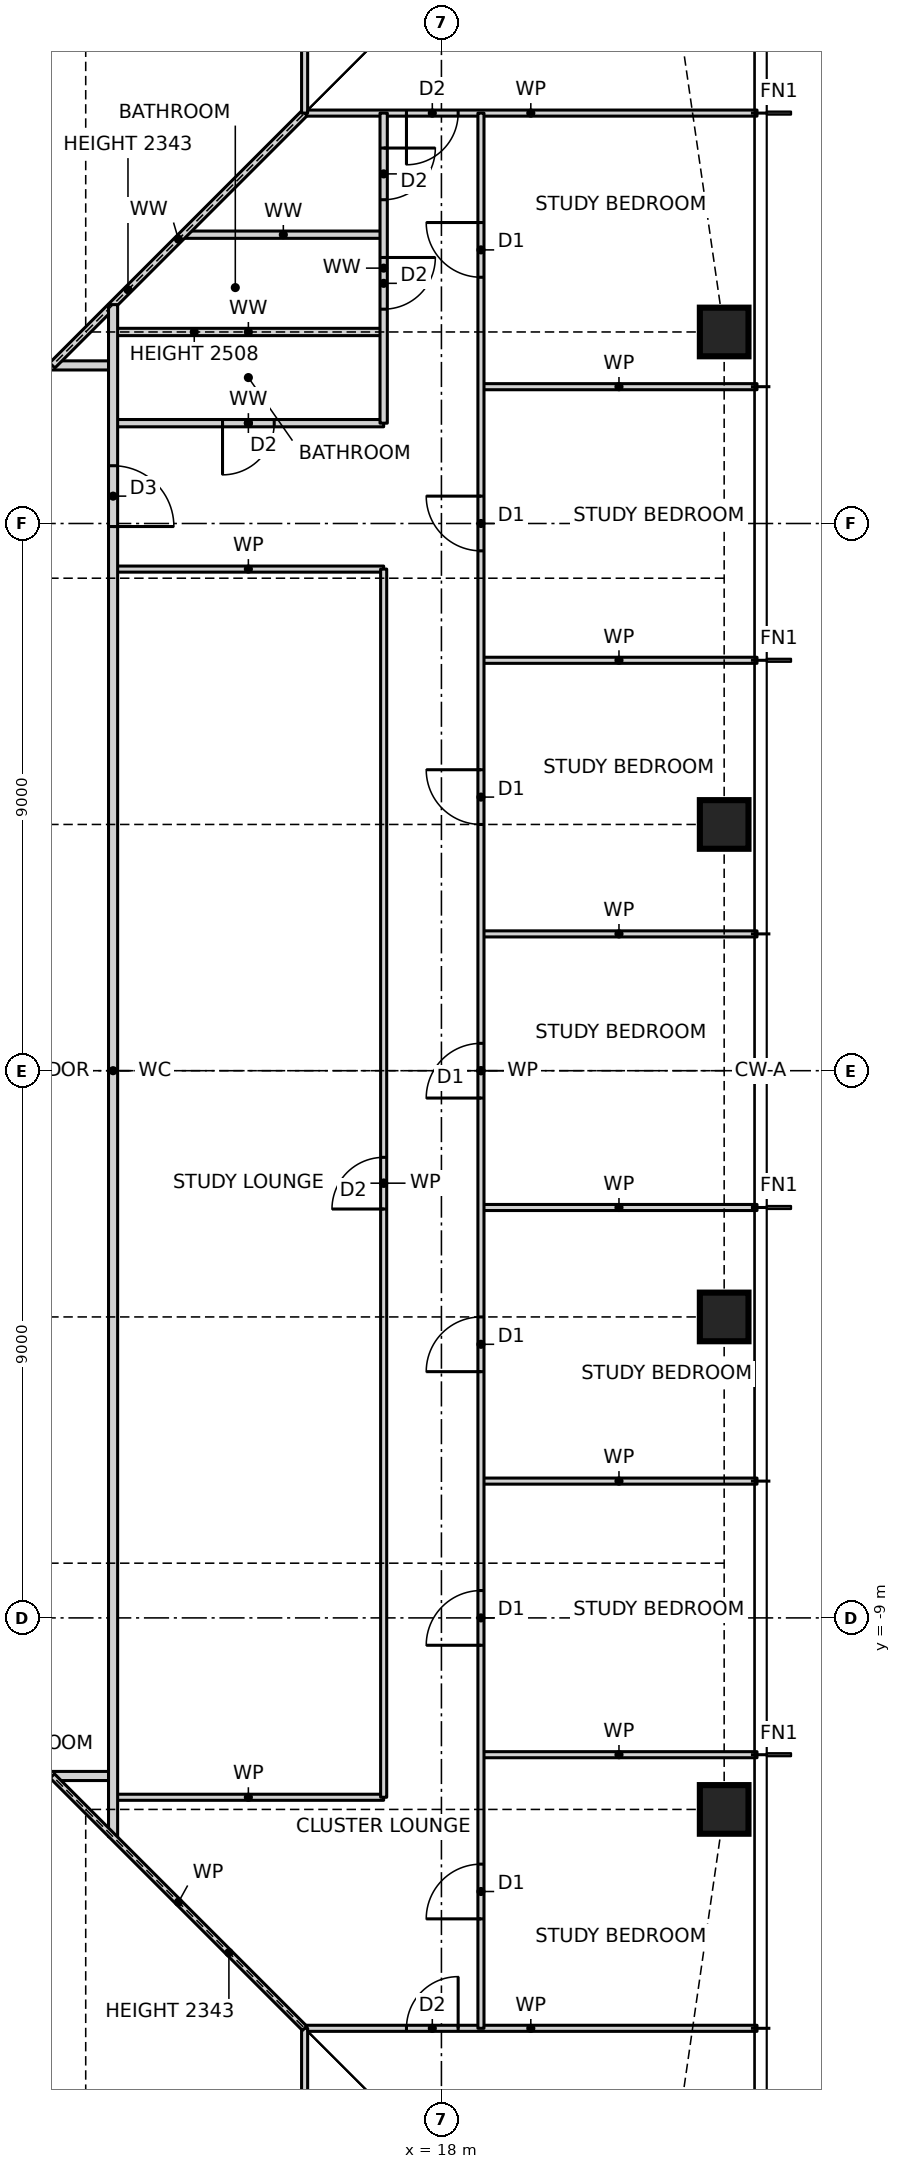
"""IFC4 building model, lengths in metres.
Left out: names, types, materials, properties, quantities, classifications, styles, units other than length and angle.
Written with IfcOpenShell. Run it as: python <this file> out.ifc"""

import sys

from ifc_helpers import new_model, si_unit, direction, frame, frame_2d, origin, origin_2d, place, context, subcontext, project, spatial, rectangle, hollow_rectangle, extrude, element, fill, save


model = new_model("IFC4")
c1 = context("Model", 3, precision=1e-05, world=origin(), true_north=direction((0.0, 1.0)))
c2 = subcontext(c1, "Body", "Model", "MODEL_VIEW")
j1 = project(units=[si_unit("LENGTHUNIT", "METRE"), si_unit("PLANEANGLEUNIT", "RADIAN")], contexts=[c1])
p1 = place(None, origin())
s1 = spatial("IfcSite", under=j1, at=p1, CompositionType="ELEMENT")
p2 = place(p1, origin())
s2 = spatial("IfcBuilding", under=s1, at=p2, CompositionType="ELEMENT")
p3 = place(p2, frame((0.0, 0.0, 32.5)))
s3 = spatial("IfcBuildingStorey", under=s2, at=p3, CompositionType="ELEMENT", Elevation=32.5)
for number, where, z_axis, x_axis in (
    (1, (22.65, -12.15, 0.0), (0.0, 0.0, 1.0), (1.0, 0.0, 0.0)),
    (2, (22.65, -4.05, 0.0), (0.0, 0.0, 1.0), (1.0, 0.0, 0.0)),
    (3, (22.65, 4.05, 0.0), (0.0, 0.0, 1.0), (1.0, 0.0, 0.0)),
    (4, (22.65, 12.15, 0.0), (0.0, 0.0, 1.0), (1.0, 0.0, 0.0)),
):
    element("IfcColumn", number, at=place(p3, frame(where, z_axis=z_axis, x_axis=x_axis)), inside=s3, PredefinedType="COLUMN", context=c2, shape_type="SweptSolid", body=[
        extrude(hollow_rectangle(XDim=0.8, YDim=0.8, WallThickness=0.09, at=origin_2d()), origin(), (0.0, 0.0, 1.0), 3.5),
    ])
p4 = place(p3, frame((15.75, -15.75, 0.0), z_axis=(0.0, 0.0, 1.0), x_axis=(1.0, 0.0, 0.0)))
e5 = element("IfcWall", 5, at=p4, inside=s3, PredefinedType="PARTITIONING", context=c2, shape_type="SweptSolid", body=[
    extrude(rectangle(XDim=7.44, YDim=0.1, at=frame_2d((3.72, 0.0))), origin(), (0.0, 0.0, 1.0), 3.27),
])
p5 = place(p4, frame((1.675, 0.0, 0.0)))
e6 = element("IfcOpeningElement", 6, at=p5, cuts=e5, PredefinedType="OPENING", context=c2, shape_type="SweptSolid", body=[
    extrude(rectangle(XDim=0.85, YDim=2.1, at=frame_2d((0.425, 1.05))), frame((0.0, 0.06, 0.0), z_axis=(0.0, -1.0, 0.0), x_axis=(1.0, 0.0, 0.0)), (0.0, 0.0, 1.0), 0.12),
])
p6 = place(p3, frame((12.6, -11.95, 0.0), z_axis=(0.0, 0.0, 1.0), x_axis=(1.0, 0.0, 0.0)))
e7 = element("IfcWall", 7, at=p6, inside=s3, PredefinedType="PARTITIONING", context=c2, shape_type="SweptSolid", body=[
    extrude(rectangle(XDim=4.45, YDim=0.1, at=frame_2d((2.225, 0.0))), origin(), (0.0, 0.0, 1.0), 3.27),
])
p7 = place(p3, frame((-11.6, -11.6, 0.0), z_axis=(0.0, 0.0, 1.0), x_axis=(1.0, 0.0, 0.0)))
e8 = element("IfcWall", 8, at=p7, inside=s3, PredefinedType="PARTITIONING", context=c2, shape_type="SweptSolid", body=[
    extrude(rectangle(XDim=24.2, YDim=0.15, at=frame_2d((12.1, 0.0))), origin(), (0.0, 0.0, 1.0), 3.27),
])
p8 = place(p7, frame((14.25, 0.0, 0.0)))
e9 = element("IfcOpeningElement", 9, at=p8, cuts=e8, PredefinedType="OPENING", context=c2, shape_type="SweptSolid", body=[
    extrude(rectangle(XDim=1.0, YDim=2.1, at=frame_2d((0.5, 1.05))), frame((0.0, 0.085, 0.0), z_axis=(0.0, -1.0, 0.0), x_axis=(1.0, 0.0, 0.0)), (0.0, 0.0, 1.0), 0.17),
])
p9 = place(p7, frame((16.4, 0.0, 0.0)))
e10 = element("IfcOpeningElement", 10, at=p9, cuts=e8, PredefinedType="OPENING", context=c2, shape_type="SweptSolid", body=[
    extrude(rectangle(XDim=0.9, YDim=2.1, at=frame_2d((0.45, 1.05))), frame((0.0, 0.085, 0.0), z_axis=(0.0, -1.0, 0.0), x_axis=(1.0, 0.0, 0.0)), (0.0, 0.0, 1.0), 0.17),
])
for number, where, z_axis, x_axis in (
    (11, (18.65, -11.25, 0.0), (0.0, 0.0, 1.0), (1.0, 0.0, 0.0)),
    (12, (18.65, -6.75, 0.0), (0.0, 0.0, 1.0), (1.0, 0.0, 0.0)),
    (13, (18.65, -2.25, 0.0), (0.0, 0.0, 1.0), (1.0, 0.0, 0.0)),
    (14, (18.65, 2.25, 0.0), (0.0, 0.0, 1.0), (1.0, 0.0, 0.0)),
    (15, (18.65, 6.75, 0.0), (0.0, 0.0, 1.0), (1.0, 0.0, 0.0)),
):
    element("IfcWall", number, at=place(p3, frame(where, z_axis=z_axis, x_axis=x_axis)), inside=s3, PredefinedType="PARTITIONING", context=c2, shape_type="SweptSolid", body=[
        extrude(rectangle(XDim=4.54, YDim=0.1, at=frame_2d((2.27, 0.0))), origin(), (0.0, 0.0, 1.0), 3.27),
    ])
p10 = place(p3, frame((12.6, 8.25, 0.0), z_axis=(0.0, 0.0, 1.0), x_axis=(1.0, 0.0, 0.0)))
e16 = element("IfcWall", 16, at=p10, inside=s3, PredefinedType="PARTITIONING", context=c2, shape_type="SweptSolid", body=[
    extrude(rectangle(XDim=4.45, YDim=0.1, at=frame_2d((2.225, 0.0))), origin(), (0.0, 0.0, 1.0), 3.27),
])
p11 = place(p3, frame((12.6, 10.65, 0.0), z_axis=(0.0, 0.0, 1.0), x_axis=(1.0, 0.0, 0.0)))
e17 = element("IfcWall", 17, at=p11, inside=s3, PredefinedType="PARTITIONING", context=c2, shape_type="SweptSolid", body=[
    extrude(rectangle(XDim=4.45, YDim=0.12, at=frame_2d((2.225, 0.0))), origin(), (0.0, 0.0, 1.0), 3.27),
])
p12 = place(p11, frame((1.8, 0.0, 0.0)))
e18 = element("IfcOpeningElement", 18, at=p12, cuts=e17, PredefinedType="OPENING", context=c2, shape_type="SweptSolid", body=[
    extrude(rectangle(XDim=0.85, YDim=2.1, at=frame_2d((0.425, 1.05))), frame((0.0, 0.07, 0.0), z_axis=(0.0, -1.0, 0.0), x_axis=(1.0, 0.0, 0.0)), (0.0, 0.0, 1.0), 0.14),
])
p13 = place(p3, frame((18.65, 11.25, 0.0), z_axis=(0.0, 0.0, 1.0), x_axis=(1.0, 0.0, 0.0)))
e19 = element("IfcWall", 19, at=p13, inside=s3, PredefinedType="PARTITIONING", context=c2, shape_type="SweptSolid", body=[
    extrude(rectangle(XDim=4.54, YDim=0.1, at=frame_2d((2.27, 0.0))), origin(), (0.0, 0.0, 1.0), 3.27),
])
p14 = place(p3, frame((-11.6, 11.6, 0.0), z_axis=(0.0, 0.0, 1.0), x_axis=(1.0, 0.0, 0.0)))
e20 = element("IfcWall", 20, at=p14, inside=s3, PredefinedType="PARTITIONING", context=c2, shape_type="SweptSolid", body=[
    extrude(rectangle(XDim=24.2, YDim=0.15, at=frame_2d((12.1, 0.0))), origin(), (0.0, 0.0, 1.0), 3.27),
])
p15 = place(p14, frame((12.855, 0.0, 0.0)))
e21 = element("IfcOpeningElement", 21, at=p15, cuts=e20, PredefinedType="OPENING", context=c2, shape_type="SweptSolid", body=[
    extrude(rectangle(XDim=1.0, YDim=2.1, at=frame_2d((0.5, 1.05))), frame((0.0, 0.085, 0.0), z_axis=(0.0, -1.0, 0.0), x_axis=(1.0, 0.0, 0.0)), (0.0, 0.0, 1.0), 0.17),
])
p16 = place(p3, frame((12.6, 12.15, 0.0), z_axis=(0.0, 0.0, 1.0), x_axis=(1.0, 0.0, 0.0)))
e22 = element("IfcWall", 22, at=p16, inside=s3, PredefinedType="PARTITIONING", context=c2, shape_type="SweptSolid", body=[
    extrude(rectangle(XDim=4.45, YDim=0.12, at=frame_2d((2.225, 0.0))), origin(), (0.0, 0.0, 1.0), 2.508),
])
p17 = place(p3, frame((13.75, 13.75, 0.0), z_axis=(0.0, 0.0, 1.0), x_axis=(1.0, 0.0, 0.0)))
e23 = element("IfcWall", 23, at=p17, inside=s3, PredefinedType="PARTITIONING", context=c2, shape_type="SweptSolid", body=[
    extrude(rectangle(XDim=3.3, YDim=0.12, at=frame_2d((1.65, 0.0))), origin(), (0.0, 0.0, 1.0), 3.27),
])
p18 = place(p3, frame((15.75, 15.75, 0.0), z_axis=(0.0, 0.0, 1.0), x_axis=(1.0, 0.0, 0.0)))
e24 = element("IfcWall", 24, at=p18, inside=s3, PredefinedType="PARTITIONING", context=c2, shape_type="SweptSolid", body=[
    extrude(rectangle(XDim=7.44, YDim=0.1, at=frame_2d((3.72, 0.0))), origin(), (0.0, 0.0, 1.0), 3.27),
])
p19 = place(p18, frame((1.675, 0.0, 0.0)))
e25 = element("IfcOpeningElement", 25, at=p19, cuts=e24, PredefinedType="OPENING", context=c2, shape_type="SweptSolid", body=[
    extrude(rectangle(XDim=0.85, YDim=2.1, at=frame_2d((0.425, 1.05))), frame((0.0, 0.06, 0.0), z_axis=(0.0, -1.0, 0.0), x_axis=(1.0, 0.0, 0.0)), (0.0, 0.0, 1.0), 0.12),
])
p20 = place(p3, frame((11.6, 11.6, 0.0), z_axis=(0.0, 0.0, 1.0), x_axis=(0.707106781187, 0.707106781187, 0.0)))
e26 = element("IfcWall", 26, at=p20, inside=s3, PredefinedType="PARTITIONING", context=c2, shape_type="SweptSolid", body=[
    extrude(rectangle(XDim=5.869, YDim=0.12, at=frame_2d((2.935, 0.0))), origin(), (0.0, 0.0, 1.0), 2.343),
])
p21 = place(p3, frame((18.65, -15.75, 0.0), z_axis=(0.0, 0.0, 1.0), x_axis=(0.0, 1.0, 0.0)))
e27 = element("IfcWall", 27, at=p21, inside=s3, PredefinedType="PARTITIONING", context=c2, shape_type="SweptSolid", body=[
    extrude(rectangle(XDim=31.5, YDim=0.1, at=frame_2d((15.75, 0.0))), origin(), (0.0, 0.0, 1.0), 3.27),
])
p22 = place(p21, frame((1.8, 0.0, 0.0)))
e28 = element("IfcOpeningElement", 28, at=p22, cuts=e27, PredefinedType="OPENING", context=c2, shape_type="SweptSolid", body=[
    extrude(rectangle(XDim=0.9, YDim=2.1, at=frame_2d((0.45, 1.05))), frame((0.0, 0.06, 0.0), z_axis=(0.0, -1.0, 0.0), x_axis=(1.0, 0.0, 0.0)), (0.0, 0.0, 1.0), 0.12),
])
p23 = place(p21, frame((6.3, 0.0, 0.0)))
e29 = element("IfcOpeningElement", 29, at=p23, cuts=e27, PredefinedType="OPENING", context=c2, shape_type="SweptSolid", body=[
    extrude(rectangle(XDim=0.9, YDim=2.1, at=frame_2d((0.45, 1.05))), frame((0.0, 0.06, 0.0), z_axis=(0.0, -1.0, 0.0), x_axis=(1.0, 0.0, 0.0)), (0.0, 0.0, 1.0), 0.12),
])
p24 = place(p21, frame((10.8, 0.0, 0.0)))
e30 = element("IfcOpeningElement", 30, at=p24, cuts=e27, PredefinedType="OPENING", context=c2, shape_type="SweptSolid", body=[
    extrude(rectangle(XDim=0.9, YDim=2.1, at=frame_2d((0.45, 1.05))), frame((0.0, 0.06, 0.0), z_axis=(0.0, -1.0, 0.0), x_axis=(1.0, 0.0, 0.0)), (0.0, 0.0, 1.0), 0.12),
])
p25 = place(p21, frame((15.3, 0.0, 0.0)))
e31 = element("IfcOpeningElement", 31, at=p25, cuts=e27, PredefinedType="OPENING", context=c2, shape_type="SweptSolid", body=[
    extrude(rectangle(XDim=0.9, YDim=2.1, at=frame_2d((0.45, 1.05))), frame((0.0, 0.06, 0.0), z_axis=(0.0, -1.0, 0.0), x_axis=(1.0, 0.0, 0.0)), (0.0, 0.0, 1.0), 0.12),
])
p26 = place(p21, frame((19.8, 0.0, 0.0)))
e32 = element("IfcOpeningElement", 32, at=p26, cuts=e27, PredefinedType="OPENING", context=c2, shape_type="SweptSolid", body=[
    extrude(rectangle(XDim=0.9, YDim=2.1, at=frame_2d((0.45, 1.05))), frame((0.0, 0.06, 0.0), z_axis=(0.0, -1.0, 0.0), x_axis=(1.0, 0.0, 0.0)), (0.0, 0.0, 1.0), 0.12),
])
p27 = place(p21, frame((24.3, 0.0, 0.0)))
e33 = element("IfcOpeningElement", 33, at=p27, cuts=e27, PredefinedType="OPENING", context=c2, shape_type="SweptSolid", body=[
    extrude(rectangle(XDim=0.9, YDim=2.1, at=frame_2d((0.45, 1.05))), frame((0.0, 0.06, 0.0), z_axis=(0.0, -1.0, 0.0), x_axis=(1.0, 0.0, 0.0)), (0.0, 0.0, 1.0), 0.12),
])
p28 = place(p21, frame((28.8, 0.0, 0.0)))
e34 = element("IfcOpeningElement", 34, at=p28, cuts=e27, PredefinedType="OPENING", context=c2, shape_type="SweptSolid", body=[
    extrude(rectangle(XDim=0.9, YDim=2.1, at=frame_2d((0.45, 1.05))), frame((0.0, 0.06, 0.0), z_axis=(0.0, -1.0, 0.0), x_axis=(1.0, 0.0, 0.0)), (0.0, 0.0, 1.0), 0.12),
])
p29 = place(p3, frame((17.05, -11.95, 0.0), z_axis=(0.0, 0.0, 1.0), x_axis=(0.0, 1.0, 0.0)))
e35 = element("IfcWall", 35, at=p29, inside=s3, PredefinedType="PARTITIONING", context=c2, shape_type="SweptSolid", body=[
    extrude(rectangle(XDim=20.2, YDim=0.1, at=frame_2d((10.1, 0.0))), origin(), (0.0, 0.0, 1.0), 3.27),
])
p30 = place(p29, frame((9.675, 0.0, 0.0)))
e36 = element("IfcOpeningElement", 36, at=p30, cuts=e35, PredefinedType="OPENING", context=c2, shape_type="SweptSolid", body=[
    extrude(rectangle(XDim=0.85, YDim=2.1, at=frame_2d((0.425, 1.05))), frame((0.0, 0.06, 0.0), z_axis=(0.0, -1.0, 0.0), x_axis=(1.0, 0.0, 0.0)), (0.0, 0.0, 1.0), 0.12),
])
p31 = place(p3, frame((17.05, 10.65, 0.0), z_axis=(0.0, 0.0, 1.0), x_axis=(0.0, 1.0, 0.0)))
e37 = element("IfcWall", 37, at=p31, inside=s3, PredefinedType="PARTITIONING", context=c2, shape_type="SweptSolid", body=[
    extrude(rectangle(XDim=5.1, YDim=0.12, at=frame_2d((2.55, 0.0))), origin(), (0.0, 0.0, 1.0), 3.27),
])
p32 = place(p31, frame((1.875, 0.0, 0.0)))
e38 = element("IfcOpeningElement", 38, at=p32, cuts=e37, PredefinedType="OPENING", context=c2, shape_type="SweptSolid", body=[
    extrude(rectangle(XDim=0.85, YDim=2.1, at=frame_2d((0.425, 1.05))), frame((0.0, 0.07, 0.0), z_axis=(0.0, -1.0, 0.0), x_axis=(1.0, 0.0, 0.0)), (0.0, 0.0, 1.0), 0.14),
])
p33 = place(p31, frame((3.675, 0.0, 0.0)))
e39 = element("IfcOpeningElement", 39, at=p33, cuts=e37, PredefinedType="OPENING", context=c2, shape_type="SweptSolid", body=[
    extrude(rectangle(XDim=0.85, YDim=2.1, at=frame_2d((0.425, 1.05))), frame((0.0, 0.07, 0.0), z_axis=(0.0, -1.0, 0.0), x_axis=(1.0, 0.0, 0.0)), (0.0, 0.0, 1.0), 0.14),
])
for number, where, z_axis, x_axis in (
    (40, (15.75, -23.19, 0.0), (0.0, 0.0, 1.0), (0.0, 1.0, 0.0)),
    (41, (15.75, 15.75, 0.0), (0.0, 0.0, 1.0), (0.0, 1.0, 0.0)),
):
    element("IfcWall", number, at=place(p3, frame(where, z_axis=z_axis, x_axis=x_axis)), inside=s3, PredefinedType="PARTITIONING", context=c2, shape_type="SweptSolid", body=[
        extrude(rectangle(XDim=7.44, YDim=0.1, at=frame_2d((3.72, 0.0))), origin(), (0.0, 0.0, 1.0), 3.27),
    ])
p34 = place(p3, frame((12.6, -12.6, 0.0), z_axis=(0.0, 0.0, 1.0), x_axis=(0.0, 1.0, 0.0)))
e42 = element("IfcWall", 42, at=p34, inside=s3, PredefinedType="PARTITIONING", context=c2, shape_type="SweptSolid", body=[
    extrude(rectangle(XDim=25.2, YDim=0.15, at=frame_2d((12.6, 0.0))), origin(), (0.0, 0.0, 1.0), 3.27),
])
p35 = place(p34, frame((21.55, 0.0, 0.0)))
e43 = element("IfcOpeningElement", 43, at=p35, cuts=e42, PredefinedType="OPENING", context=c2, shape_type="SweptSolid", body=[
    extrude(rectangle(XDim=1.0, YDim=2.1, at=frame_2d((0.5, 1.05))), frame((0.0, 0.085, 0.0), z_axis=(0.0, -1.0, 0.0), x_axis=(1.0, 0.0, 0.0)), (0.0, 0.0, 1.0), 0.17),
])
p36 = place(p3, frame((15.75, -15.75, 0.0), z_axis=(0.0, 0.0, 1.0), x_axis=(-0.707106781187, 0.707106781187, 0.0)))
e44 = element("IfcWall", 44, at=p36, inside=s3, PredefinedType="PARTITIONING", context=c2, shape_type="SweptSolid", body=[
    extrude(rectangle(XDim=5.869, YDim=0.1, at=frame_2d((2.935, 0.0))), origin(), (0.0, 0.0, 1.0), 2.343),
])
p37 = place(p22, origin())
e45 = element("IfcDoor", 45, at=p37, inside=s3, OperationType="SINGLE_SWING_LEFT", PredefinedType="DOOR", context=c2, shape_type="SweptSolid", body=[
    extrude(rectangle(XDim=0.9, YDim=2.1, at=frame_2d((0.45, 1.05))), frame((0.0, 0.025, 0.0), z_axis=(0.0, -1.0, 0.0), x_axis=(1.0, 0.0, 0.0)), (0.0, 0.0, 1.0), 0.05),
])
fill(e28, e45)
p38 = place(p23, origin())
e46 = element("IfcDoor", 46, at=p38, inside=s3, OperationType="SINGLE_SWING_LEFT", PredefinedType="DOOR", context=c2, shape_type="SweptSolid", body=[
    extrude(rectangle(XDim=0.9, YDim=2.1, at=frame_2d((0.45, 1.05))), frame((0.0, 0.025, 0.0), z_axis=(0.0, -1.0, 0.0), x_axis=(1.0, 0.0, 0.0)), (0.0, 0.0, 1.0), 0.05),
])
fill(e29, e46)
p39 = place(p24, origin())
e47 = element("IfcDoor", 47, at=p39, inside=s3, OperationType="SINGLE_SWING_LEFT", PredefinedType="DOOR", context=c2, shape_type="SweptSolid", body=[
    extrude(rectangle(XDim=0.9, YDim=2.1, at=frame_2d((0.45, 1.05))), frame((0.0, 0.025, 0.0), z_axis=(0.0, -1.0, 0.0), x_axis=(1.0, 0.0, 0.0)), (0.0, 0.0, 1.0), 0.05),
])
fill(e30, e47)
p40 = place(p25, origin())
e48 = element("IfcDoor", 48, at=p40, inside=s3, OperationType="SINGLE_SWING_LEFT", PredefinedType="DOOR", context=c2, shape_type="SweptSolid", body=[
    extrude(rectangle(XDim=0.9, YDim=2.1, at=frame_2d((0.45, 1.05))), frame((0.0, 0.025, 0.0), z_axis=(0.0, -1.0, 0.0), x_axis=(1.0, 0.0, 0.0)), (0.0, 0.0, 1.0), 0.05),
])
fill(e31, e48)
p41 = place(p26, origin())
e49 = element("IfcDoor", 49, at=p41, inside=s3, OperationType="SINGLE_SWING_RIGHT", PredefinedType="DOOR", context=c2, shape_type="SweptSolid", body=[
    extrude(rectangle(XDim=0.9, YDim=2.1, at=frame_2d((0.45, 1.05))), frame((0.0, 0.025, 0.0), z_axis=(0.0, -1.0, 0.0), x_axis=(1.0, 0.0, 0.0)), (0.0, 0.0, 1.0), 0.05),
])
fill(e32, e49)
p42 = place(p27, origin())
e50 = element("IfcDoor", 50, at=p42, inside=s3, OperationType="SINGLE_SWING_RIGHT", PredefinedType="DOOR", context=c2, shape_type="SweptSolid", body=[
    extrude(rectangle(XDim=0.9, YDim=2.1, at=frame_2d((0.45, 1.05))), frame((0.0, 0.025, 0.0), z_axis=(0.0, -1.0, 0.0), x_axis=(1.0, 0.0, 0.0)), (0.0, 0.0, 1.0), 0.05),
])
fill(e33, e50)
p43 = place(p28, origin())
e51 = element("IfcDoor", 51, at=p43, inside=s3, OperationType="SINGLE_SWING_RIGHT", PredefinedType="DOOR", context=c2, shape_type="SweptSolid", body=[
    extrude(rectangle(XDim=0.9, YDim=2.1, at=frame_2d((0.45, 1.05))), frame((0.0, 0.025, 0.0), z_axis=(0.0, -1.0, 0.0), x_axis=(1.0, 0.0, 0.0)), (0.0, 0.0, 1.0), 0.05),
])
fill(e34, e51)
p44 = place(p35, frame((1.0, 0.0, 0.0), z_axis=(0.0, 0.0, 1.0), x_axis=(-1.0, 0.0, 0.0)))
e52 = element("IfcDoor", 52, at=p44, inside=s3, OperationType="SINGLE_SWING_RIGHT", PredefinedType="DOOR", context=c2, shape_type="SweptSolid", body=[
    extrude(rectangle(XDim=1.0, YDim=2.1, at=frame_2d((0.5, 1.05))), frame((0.0, 0.025, 0.0), z_axis=(0.0, -1.0, 0.0), x_axis=(1.0, 0.0, 0.0)), (0.0, 0.0, 1.0), 0.05),
])
fill(e43, e52)
p45 = place(p30, origin())
e53 = element("IfcDoor", 53, at=p45, inside=s3, OperationType="SINGLE_SWING_LEFT", PredefinedType="DOOR", context=c2, shape_type="SweptSolid", body=[
    extrude(rectangle(XDim=0.85, YDim=2.1, at=frame_2d((0.425, 1.05))), frame((0.0, 0.025, 0.0), z_axis=(0.0, -1.0, 0.0), x_axis=(1.0, 0.0, 0.0)), (0.0, 0.0, 1.0), 0.05),
])
fill(e36, e53)
p46 = place(p12, frame((0.85, 0.0, 0.0), z_axis=(0.0, 0.0, 1.0), x_axis=(-1.0, 0.0, 0.0)))
e54 = element("IfcDoor", 54, at=p46, inside=s3, OperationType="SINGLE_SWING_RIGHT", PredefinedType="DOOR", context=c2, shape_type="SweptSolid", body=[
    extrude(rectangle(XDim=0.85, YDim=2.1, at=frame_2d((0.425, 1.05))), frame((0.0, 0.025, 0.0), z_axis=(0.0, -1.0, 0.0), x_axis=(1.0, 0.0, 0.0)), (0.0, 0.0, 1.0), 0.05),
])
fill(e18, e54)
p47 = place(p32, frame((0.85, 0.0, 0.0), z_axis=(0.0, 0.0, 1.0), x_axis=(-1.0, 0.0, 0.0)))
e55 = element("IfcDoor", 55, at=p47, inside=s3, OperationType="SINGLE_SWING_LEFT", PredefinedType="DOOR", context=c2, shape_type="SweptSolid", body=[
    extrude(rectangle(XDim=0.85, YDim=2.1, at=frame_2d((0.425, 1.05))), frame((0.0, 0.025, 0.0), z_axis=(0.0, -1.0, 0.0), x_axis=(1.0, 0.0, 0.0)), (0.0, 0.0, 1.0), 0.05),
])
fill(e38, e55)
p48 = place(p33, frame((0.85, 0.0, 0.0), z_axis=(0.0, 0.0, 1.0), x_axis=(-1.0, 0.0, 0.0)))
e56 = element("IfcDoor", 56, at=p48, inside=s3, OperationType="SINGLE_SWING_LEFT", PredefinedType="DOOR", context=c2, shape_type="SweptSolid", body=[
    extrude(rectangle(XDim=0.85, YDim=2.1, at=frame_2d((0.425, 1.05))), frame((0.0, 0.025, 0.0), z_axis=(0.0, -1.0, 0.0), x_axis=(1.0, 0.0, 0.0)), (0.0, 0.0, 1.0), 0.05),
])
fill(e39, e56)
p49 = place(p5, origin())
e57 = element("IfcDoor", 57, at=p49, inside=s3, OperationType="SINGLE_SWING_RIGHT", PredefinedType="DOOR", context=c2, shape_type="SweptSolid", body=[
    extrude(rectangle(XDim=0.85, YDim=2.1, at=frame_2d((0.425, 1.05))), frame((0.0, 0.025, 0.0), z_axis=(0.0, -1.0, 0.0), x_axis=(1.0, 0.0, 0.0)), (0.0, 0.0, 1.0), 0.05),
])
fill(e6, e57)
p50 = place(p19, frame((0.85, 0.0, 0.0), z_axis=(0.0, 0.0, 1.0), x_axis=(-1.0, 0.0, 0.0)))
e58 = element("IfcDoor", 58, at=p50, inside=s3, OperationType="SINGLE_SWING_RIGHT", PredefinedType="DOOR", context=c2, shape_type="SweptSolid", body=[
    extrude(rectangle(XDim=0.85, YDim=2.1, at=frame_2d((0.425, 1.05))), frame((0.0, 0.025, 0.0), z_axis=(0.0, -1.0, 0.0), x_axis=(1.0, 0.0, 0.0)), (0.0, 0.0, 1.0), 0.05),
])
fill(e25, e58)
save(model, sys.argv[1])
